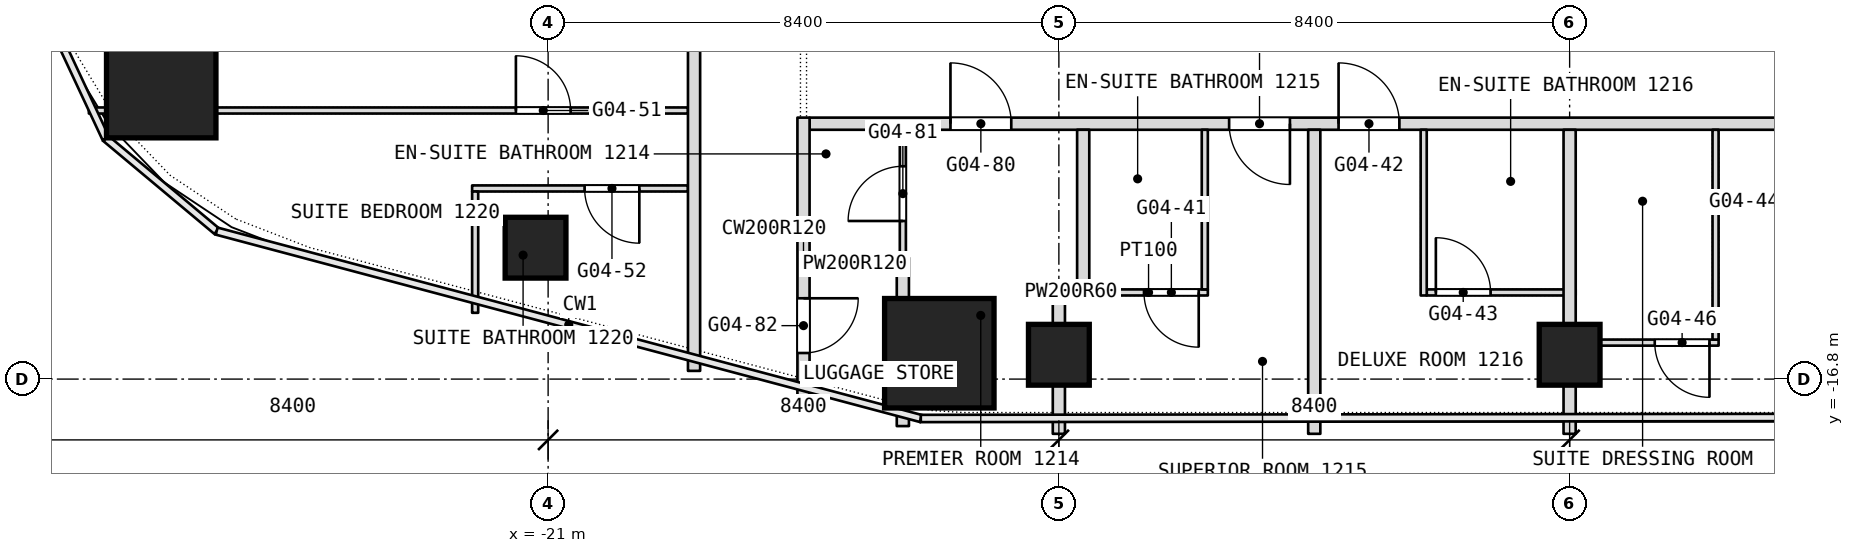
"""IFC4 building model, lengths in metres.
Left out: names, types, materials, properties, quantities, classifications, styles, units other than length and angle.
Written with IfcOpenShell. Run it as: python <this file> out.ifc"""

import sys

from ifc_helpers import new_model, si_unit, direction, frame, frame_2d, origin, origin_2d, place, context, subcontext, project, spatial, rectangle, extrude, element, fill, save


model = new_model("IFC4")
c1 = context("Model", 3, precision=1e-05, world=origin(), true_north=direction((0.0, 1.0)))
c2 = subcontext(c1, "Body", "Model", "MODEL_VIEW")
j1 = project(units=[si_unit("LENGTHUNIT", "METRE"), si_unit("PLANEANGLEUNIT", "RADIAN")], contexts=[c1])
p1 = place(None, origin())
s1 = spatial("IfcSite", under=j1, at=p1, CompositionType="ELEMENT")
p2 = place(p1, origin())
s2 = spatial("IfcBuilding", under=s1, at=p2, CompositionType="ELEMENT")
p3 = place(p2, frame((0.0, 0.0, 58.1)))
s3 = spatial("IfcBuildingStorey", under=s2, at=p3, CompositionType="ELEMENT", Elevation=58.1)
for number, where, z_axis, x_axis in (
    (1, (-27.363, -11.933, 0.0), (0.0, 0.0, 1.0), (1.0, 0.0, 0.0)),
    (2, (-14.566, -16.375, 0.0), (0.0, 0.0, 1.0), (1.0, 0.0, 0.0)),
):
    element("IfcColumn", number, at=place(p3, frame(where, z_axis=z_axis, x_axis=x_axis)), inside=s3, PredefinedType="COLUMN", context=c2, shape_type="SweptSolid", body=[
        extrude(rectangle(XDim=1.8, YDim=1.8, at=origin_2d()), origin(), (0.0, 0.0, 1.0), 3.6),
    ])
for number, where, z_axis, x_axis in (
    (3, (-4.2, -16.4, 0.0), (0.0, 0.0, 1.0), (1.0, 0.0, 0.0)),
    (4, (-12.6, -16.4, 0.0), (0.0, 0.0, 1.0), (1.0, 0.0, 0.0)),
    (5, (-21.207, -14.639, 0.0), (0.0, 0.0, 1.0), (1.0, 0.0, 0.0)),
):
    element("IfcColumn", number, at=place(p3, frame(where, z_axis=z_axis, x_axis=x_axis)), inside=s3, PredefinedType="COLUMN", context=c2, shape_type="SweptSolid", body=[
        extrude(rectangle(XDim=1.0, YDim=1.0, at=origin_2d()), origin(), (0.0, 0.0, 1.0), 3.6),
    ])
p4 = place(p3, frame((-4.1, -16.2, 0.0), z_axis=(0.0, 0.0, 1.0), x_axis=(1.0, 0.0, 0.0)))
e6 = element("IfcWall", 6, at=p4, inside=s3, PredefinedType="PARTITIONING", context=c2, shape_type="SweptSolid", body=[
    extrude(rectangle(XDim=2.35, YDim=0.1, at=frame_2d((1.175, 0.0))), origin(), (0.0, 0.0, 1.0), 2.94),
])
p5 = place(p4, frame((1.3, 0.0, 0.0)))
e7 = element("IfcOpeningElement", 7, at=p5, cuts=e6, PredefinedType="OPENING", context=c2, shape_type="SweptSolid", body=[
    extrude(rectangle(XDim=0.9, YDim=2.1, at=frame_2d((0.45, 1.05))), frame((0.0, 0.05, 0.0), z_axis=(0.0, -1.0, 0.0), x_axis=(1.0, 0.0, 0.0)), (0.0, 0.0, 1.0), 0.1),
])
p6 = place(p3, frame((-12.7, -15.375, 0.0), z_axis=(0.0, 0.0, 1.0), x_axis=(1.0, 0.0, 0.0)))
e8 = element("IfcWall", 8, at=p6, inside=s3, PredefinedType="PARTITIONING", context=c2, shape_type="SweptSolid", body=[
    extrude(rectangle(XDim=0.6, YDim=0.2, at=frame_2d((0.3, 0.0))), origin(), (0.0, 0.0, 1.0), 3.34),
])
p7 = place(p3, frame((-12.1, -15.375, 0.0), z_axis=(0.0, 0.0, 1.0), x_axis=(1.0, 0.0, 0.0)))
e9 = element("IfcWall", 9, at=p7, inside=s3, PredefinedType="PARTITIONING", context=c2, shape_type="SweptSolid", body=[
    extrude(rectangle(XDim=1.95, YDim=0.1, at=frame_2d((0.975, 0.0))), origin(), (0.0, 0.0, 1.0), 3.34),
])
p8 = place(p7, frame((0.9, 0.0, 0.0)))
e10 = element("IfcOpeningElement", 10, at=p8, cuts=e9, PredefinedType="OPENING", context=c2, shape_type="SweptSolid", body=[
    extrude(rectangle(XDim=0.9, YDim=2.1, at=frame_2d((0.45, 1.05))), frame((0.0, 0.05, 0.0), z_axis=(0.0, -1.0, 0.0), x_axis=(1.0, 0.0, 0.0)), (0.0, 0.0, 1.0), 0.1),
])
p9 = place(p3, frame((-6.55, -15.375, 0.0), z_axis=(0.0, 0.0, 1.0), x_axis=(1.0, 0.0, 0.0)))
e11 = element("IfcWall", 11, at=p9, inside=s3, PredefinedType="PARTITIONING", context=c2, shape_type="SweptSolid", body=[
    extrude(rectangle(XDim=2.45, YDim=0.1, at=frame_2d((1.225, 0.0))), origin(), (0.0, 0.0, 1.0), 3.34),
])
p10 = place(p9, frame((0.15, 0.0, 0.0)))
e12 = element("IfcOpeningElement", 12, at=p10, cuts=e11, PredefinedType="OPENING", context=c2, shape_type="SweptSolid", body=[
    extrude(rectangle(XDim=0.9, YDim=2.1, at=frame_2d((0.45, 1.05))), frame((0.0, 0.05, 0.0), z_axis=(0.0, -1.0, 0.0), x_axis=(1.0, 0.0, 0.0)), (0.0, 0.0, 1.0), 0.1),
])
p11 = place(p3, frame((-16.7, -14.9, 0.0), z_axis=(0.0, 0.0, 1.0), x_axis=(1.0, 0.0, 0.0)))
e13 = element("IfcWall", 13, at=p11, inside=s3, PredefinedType="PARTITIONING", context=c2, shape_type="SweptSolid", body=[
    extrude(rectangle(XDim=1.484, YDim=0.2, at=frame_2d((0.742, 0.0))), origin(), (0.0, 0.0, 1.0), 3.34),
])
p12 = place(p3, frame((-22.25, -13.665, 0.0), z_axis=(0.0, 0.0, 1.0), x_axis=(1.0, 0.0, 0.0)))
e14 = element("IfcWall", 14, at=p12, inside=s3, PredefinedType="PARTITIONING", context=c2, shape_type="SweptSolid", body=[
    extrude(rectangle(XDim=3.55, YDim=0.1, at=frame_2d((1.775, 0.0))), origin(), (0.0, 0.0, 1.0), 3.34),
])
p13 = place(p12, frame((1.85, 0.0, 0.0)))
e15 = element("IfcOpeningElement", 15, at=p13, cuts=e14, PredefinedType="OPENING", context=c2, shape_type="SweptSolid", body=[
    extrude(rectangle(XDim=0.9, YDim=2.1, at=frame_2d((0.45, 1.05))), frame((0.0, 0.05, 0.0), z_axis=(0.0, -1.0, 0.0), x_axis=(1.0, 0.0, 0.0)), (0.0, 0.0, 1.0), 0.1),
])
p14 = place(p3, frame((-16.7, -12.6, 0.0), z_axis=(0.0, 0.0, 1.0), x_axis=(1.0, 0.0, 0.0)))
e16 = element("IfcWall", 16, at=p14, inside=s3, PredefinedType="PARTITIONING", context=c2, shape_type="SweptSolid", body=[
    extrude(rectangle(XDim=33.4, YDim=0.2, at=frame_2d((16.7, 0.0))), origin(), (0.0, 0.0, 1.0), 3.34),
])
p15 = place(p14, frame((6.9, 0.0, 0.0)))
e17 = element("IfcOpeningElement", 17, at=p15, cuts=e16, PredefinedType="OPENING", context=c2, shape_type="SweptSolid", body=[
    extrude(rectangle(XDim=1.0, YDim=2.1, at=frame_2d((0.5, 1.05))), frame((0.0, 0.1, 0.0), z_axis=(0.0, -1.0, 0.0), x_axis=(1.0, 0.0, 0.0)), (0.0, 0.0, 1.0), 0.2),
])
p16 = place(p14, frame((8.7, 0.0, 0.0)))
e18 = element("IfcOpeningElement", 18, at=p16, cuts=e16, PredefinedType="OPENING", context=c2, shape_type="SweptSolid", body=[
    extrude(rectangle(XDim=1.0, YDim=2.1, at=frame_2d((0.5, 1.05))), frame((0.0, 0.1, 0.0), z_axis=(0.0, -1.0, 0.0), x_axis=(1.0, 0.0, 0.0)), (0.0, 0.0, 1.0), 0.2),
])
p17 = place(p14, frame((16.1, 0.0, 0.0)))
e19 = element("IfcOpeningElement", 19, at=p17, cuts=e16, PredefinedType="OPENING", context=c2, shape_type="SweptSolid", body=[
    extrude(rectangle(XDim=1.1, YDim=2.1, at=frame_2d((0.55, 1.05))), frame((0.0, 0.1, 0.0), z_axis=(0.0, -1.0, 0.0), x_axis=(1.0, 0.0, 0.0)), (0.0, 0.0, 1.0), 0.2),
])
p18 = place(p14, frame((24.6, 0.0, 0.0)))
e20 = element("IfcOpeningElement", 20, at=p18, cuts=e16, PredefinedType="OPENING", context=c2, shape_type="SweptSolid", body=[
    extrude(rectangle(XDim=1.1, YDim=2.1, at=frame_2d((0.55, 1.05))), frame((0.0, 0.1, 0.0), z_axis=(0.0, -1.0, 0.0), x_axis=(1.0, 0.0, 0.0)), (0.0, 0.0, 1.0), 0.2),
])
p19 = place(p14, frame((2.317, 0.0, 0.0)))
e21 = element("IfcOpeningElement", 21, at=p19, cuts=e16, PredefinedType="OPENING", context=c2, shape_type="SweptSolid", body=[
    extrude(rectangle(XDim=1.0, YDim=2.1, at=frame_2d((0.5, 1.05))), frame((0.0, 0.1, 0.0), z_axis=(0.0, -1.0, 0.0), x_axis=(1.0, 0.0, 0.0)), (0.0, 0.0, 1.0), 0.2),
])
p20 = place(p14, frame((30.033, 0.0, 0.0)))
e22 = element("IfcOpeningElement", 22, at=p20, cuts=e16, PredefinedType="OPENING", context=c2, shape_type="SweptSolid", body=[
    extrude(rectangle(XDim=1.0, YDim=2.1, at=frame_2d((0.5, 1.05))), frame((0.0, 0.1, 0.0), z_axis=(0.0, -1.0, 0.0), x_axis=(1.0, 0.0, 0.0)), (0.0, 0.0, 1.0), 0.2),
])
p21 = place(p3, frame((-28.553, -12.383, 0.0), z_axis=(0.0, 0.0, 1.0), x_axis=(1.0, 0.0, 0.0)))
e23 = element("IfcWall", 23, at=p21, inside=s3, PredefinedType="PARTITIONING", context=c2, shape_type="SweptSolid", body=[
    extrude(rectangle(XDim=0.29, YDim=0.1, at=frame_2d((0.145, 0.0))), origin(), (0.0, 0.0, 1.0), 3.34),
])
p22 = place(p3, frame((-26.463, -12.383, 0.0), z_axis=(0.0, 0.0, 1.0), x_axis=(1.0, 0.0, 0.0)))
e24 = element("IfcWall", 24, at=p22, inside=s3, PredefinedType="PARTITIONING", context=c2, shape_type="SweptSolid", body=[
    extrude(rectangle(XDim=7.763, YDim=0.1, at=frame_2d((3.881, 0.0))), origin(), (0.0, 0.0, 1.0), 3.34),
])
p23 = place(p22, frame((4.933, 0.0, 0.0)))
e25 = element("IfcOpeningElement", 25, at=p23, cuts=e24, PredefinedType="OPENING", context=c2, shape_type="SweptSolid", body=[
    extrude(rectangle(XDim=0.9, YDim=2.1, at=frame_2d((0.45, 1.05))), frame((0.0, 0.05, 0.0), z_axis=(0.0, -1.0, 0.0), x_axis=(1.0, 0.0, 0.0)), (0.0, 0.0, 1.0), 0.1),
])
p24 = place(p3, frame((-1.8, -16.15, 0.0), z_axis=(0.0, 0.0, 1.0), x_axis=(0.0, 1.0, 0.0)))
e26 = element("IfcWall", 26, at=p24, inside=s3, PredefinedType="PARTITIONING", context=c2, shape_type="SweptSolid", body=[
    extrude(rectangle(XDim=3.45, YDim=0.1, at=frame_2d((1.725, 0.0))), origin(), (0.0, 0.0, 1.0), 3.34),
])
p25 = place(p3, frame((-4.2, -17.7, 0.0), z_axis=(0.0, 0.0, 1.0), x_axis=(0.0, 1.0, 0.0)))
e27 = element("IfcWall", 27, at=p25, inside=s3, PredefinedType="PARTITIONING", context=c2, shape_type="SweptSolid", body=[
    extrude(rectangle(XDim=5.0, YDim=0.2, at=frame_2d((2.5, 0.0))), origin(), (0.0, 0.0, 1.0), 3.34),
])
p26 = place(p3, frame((-6.6, -15.425, 0.0), z_axis=(0.0, 0.0, 1.0), x_axis=(0.0, 1.0, 0.0)))
e28 = element("IfcWall", 28, at=p26, inside=s3, PredefinedType="PARTITIONING", context=c2, shape_type="SweptSolid", body=[
    extrude(rectangle(XDim=2.725, YDim=0.1, at=frame_2d((1.363, 0.0))), origin(), (0.0, 0.0, 1.0), 3.34),
])
p27 = place(p3, frame((-8.4, -17.7, 0.0), z_axis=(0.0, 0.0, 1.0), x_axis=(0.0, 1.0, 0.0)))
e29 = element("IfcWall", 29, at=p27, inside=s3, PredefinedType="PARTITIONING", context=c2, shape_type="SweptSolid", body=[
    extrude(rectangle(XDim=5.0, YDim=0.2, at=frame_2d((2.5, 0.0))), origin(), (0.0, 0.0, 1.0), 3.34),
])
p28 = place(p3, frame((-10.2, -15.325, 0.0), z_axis=(0.0, 0.0, 1.0), x_axis=(0.0, 1.0, 0.0)))
e30 = element("IfcWall", 30, at=p28, inside=s3, PredefinedType="PARTITIONING", context=c2, shape_type="SweptSolid", body=[
    extrude(rectangle(XDim=2.625, YDim=0.1, at=frame_2d((1.312, 0.0))), origin(), (0.0, 0.0, 1.0), 3.34),
])
p29 = place(p3, frame((-12.2, -15.275, 0.0), z_axis=(0.0, 0.0, 1.0), x_axis=(0.0, 1.0, 0.0)))
e31 = element("IfcWall", 31, at=p29, inside=s3, PredefinedType="PARTITIONING", context=c2, shape_type="SweptSolid", body=[
    extrude(rectangle(XDim=2.575, YDim=0.2, at=frame_2d((1.288, 0.0))), origin(), (0.0, 0.0, 1.0), 3.34),
])
p30 = place(p3, frame((-12.6, -17.7, 0.0), z_axis=(0.0, 0.0, 1.0), x_axis=(0.0, 1.0, 0.0)))
e32 = element("IfcWall", 32, at=p30, inside=s3, PredefinedType="PARTITIONING", context=c2, shape_type="SweptSolid", body=[
    extrude(rectangle(XDim=2.225, YDim=0.2, at=frame_2d((1.112, 0.0))), origin(), (0.0, 0.0, 1.0), 3.34),
])
p31 = place(p3, frame((-15.166, -17.573, 0.0), z_axis=(0.0, 0.0, 1.0), x_axis=(0.0, 1.0, 0.0)))
e33 = element("IfcWall", 33, at=p31, inside=s3, PredefinedType="PARTITIONING", context=c2, shape_type="SweptSolid", body=[
    extrude(rectangle(XDim=0.298, YDim=0.2, at=frame_2d((0.149, 0.0))), origin(), (0.0, 0.0, 1.0), 3.34),
])
p32 = place(p3, frame((-15.166, -15.475, 0.0), z_axis=(0.0, 0.0, 1.0), x_axis=(0.0, 1.0, 0.0)))
e34 = element("IfcWall", 34, at=p32, inside=s3, PredefinedType="PARTITIONING", context=c2, shape_type="SweptSolid", body=[
    extrude(rectangle(XDim=0.675, YDim=0.2, at=frame_2d((0.337, 0.0))), origin(), (0.0, 0.0, 1.0), 3.34),
])
p33 = place(p3, frame((-15.166, -15.0, 0.0), z_axis=(0.0, 0.0, 1.0), x_axis=(0.0, 1.0, 0.0)))
e35 = element("IfcWall", 35, at=p33, inside=s3, PredefinedType="PARTITIONING", context=c2, shape_type="SweptSolid", body=[
    extrude(rectangle(XDim=2.3, YDim=0.1, at=frame_2d((1.15, 0.0))), origin(), (0.0, 0.0, 1.0), 3.34),
])
p34 = place(p33, frame((0.8, 0.0, 0.0)))
e36 = element("IfcOpeningElement", 36, at=p34, cuts=e35, PredefinedType="OPENING", context=c2, shape_type="SweptSolid", body=[
    extrude(rectangle(XDim=0.9, YDim=2.1, at=frame_2d((0.45, 1.05))), frame((0.0, 0.05, 0.0), z_axis=(0.0, -1.0, 0.0), x_axis=(1.0, 0.0, 0.0)), (0.0, 0.0, 1.0), 0.1),
])
p35 = place(p3, frame((-16.8, -17.143, 0.0), z_axis=(0.0, 0.0, 1.0), x_axis=(0.0, 1.0, 0.0)))
e37 = element("IfcWall", 37, at=p35, inside=s3, PredefinedType="PARTITIONING", context=c2, shape_type="SweptSolid", body=[
    extrude(rectangle(XDim=4.643, YDim=0.2, at=frame_2d((2.322, 0.0))), origin(), (0.0, 0.0, 1.0), 3.34),
])
p36 = place(p35, frame((0.772, 0.0, 0.0)))
e38 = element("IfcOpeningElement", 38, at=p36, cuts=e37, PredefinedType="OPENING", context=c2, shape_type="SweptSolid", body=[
    extrude(rectangle(XDim=0.9, YDim=2.1, at=frame_2d((0.45, 1.05))), frame((0.0, 0.1, 0.0), z_axis=(0.0, -1.0, 0.0), x_axis=(1.0, 0.0, 0.0)), (0.0, 0.0, 1.0), 0.2),
])
p37 = place(p3, frame((-18.6, -16.665, 0.0), z_axis=(0.0, 0.0, 1.0), x_axis=(0.0, 1.0, 0.0)))
e39 = element("IfcWall", 39, at=p37, inside=s3, PredefinedType="PARTITIONING", context=c2, shape_type="SweptSolid", body=[
    extrude(rectangle(XDim=23.565, YDim=0.2, at=frame_2d((11.782, 0.0))), origin(), (0.0, 0.0, 1.0), 3.34),
])
p38 = place(p37, frame((5.724, 0.0, 0.0)))
e40 = element("IfcOpeningElement", 40, at=p38, cuts=e39, PredefinedType="OPENING", context=c2, shape_type="SweptSolid", body=[
    extrude(rectangle(XDim=1.1, YDim=2.1, at=frame_2d((0.55, 1.05))), frame((0.0, 0.1, 0.0), z_axis=(0.0, -1.0, 0.0), x_axis=(1.0, 0.0, 0.0)), (0.0, 0.0, 1.0), 0.2),
])
p39 = place(p37, frame((8.665, 0.0, 0.0)))
e41 = element("IfcOpeningElement", 41, at=p39, cuts=e39, PredefinedType="OPENING", context=c2, shape_type="SweptSolid", body=[
    extrude(rectangle(XDim=1.0, YDim=2.1, at=frame_2d((0.5, 1.05))), frame((0.0, 0.1, 0.0), z_axis=(0.0, -1.0, 0.0), x_axis=(1.0, 0.0, 0.0)), (0.0, 0.0, 1.0), 0.2),
])
p40 = place(p37, frame((15.265, 0.0, 0.0)))
e42 = element("IfcOpeningElement", 42, at=p40, cuts=e39, PredefinedType="OPENING", context=c2, shape_type="SweptSolid", body=[
    extrude(rectangle(XDim=1.0, YDim=2.1, at=frame_2d((0.5, 1.05))), frame((0.0, 0.1, 0.0), z_axis=(0.0, -1.0, 0.0), x_axis=(1.0, 0.0, 0.0)), (0.0, 0.0, 1.0), 0.2),
])
p41 = place(p37, frame((19.465, 0.0, 0.0)))
e43 = element("IfcOpeningElement", 43, at=p41, cuts=e39, PredefinedType="OPENING", context=c2, shape_type="SweptSolid", body=[
    extrude(rectangle(XDim=1.0, YDim=2.1, at=frame_2d((0.5, 1.05))), frame((0.0, 0.1, 0.0), z_axis=(0.0, -1.0, 0.0), x_axis=(1.0, 0.0, 0.0)), (0.0, 0.0, 1.0), 0.2),
])
p42 = place(p3, frame((-22.2, -15.71, 0.0), z_axis=(0.0, 0.0, 1.0), x_axis=(0.0, 1.0, 0.0)))
e44 = element("IfcWall", 44, at=p42, inside=s3, PredefinedType="PARTITIONING", context=c2, shape_type="SweptSolid", body=[
    extrude(rectangle(XDim=1.995, YDim=0.1, at=frame_2d((0.998, 0.0))), origin(), (0.0, 0.0, 1.0), 3.34),
])
p43 = place(p5, origin())
e45 = element("IfcDoor", 45, at=p43, inside=s3, OperationType="SINGLE_SWING_RIGHT", PredefinedType="DOOR", context=c2, shape_type="SweptSolid", body=[
    extrude(rectangle(XDim=0.9, YDim=2.1, at=frame_2d((0.45, 1.05))), frame((0.0, 0.025, 0.0), z_axis=(0.0, -1.0, 0.0), x_axis=(1.0, 0.0, 0.0)), (0.0, 0.0, 1.0), 0.05),
])
fill(e7, e45)
p44 = place(p8, origin())
e46 = element("IfcDoor", 46, at=p44, inside=s3, OperationType="SINGLE_SWING_RIGHT", PredefinedType="DOOR", context=c2, shape_type="SweptSolid", body=[
    extrude(rectangle(XDim=0.9, YDim=2.1, at=frame_2d((0.45, 1.05))), frame((0.0, 0.025, 0.0), z_axis=(0.0, -1.0, 0.0), x_axis=(1.0, 0.0, 0.0)), (0.0, 0.0, 1.0), 0.05),
])
fill(e10, e46)
p45 = place(p10, origin())
e47 = element("IfcDoor", 47, at=p45, inside=s3, OperationType="SINGLE_SWING_LEFT", PredefinedType="DOOR", context=c2, shape_type="SweptSolid", body=[
    extrude(rectangle(XDim=0.9, YDim=2.1, at=frame_2d((0.45, 1.05))), frame((0.0, 0.025, 0.0), z_axis=(0.0, -1.0, 0.0), x_axis=(1.0, 0.0, 0.0)), (0.0, 0.0, 1.0), 0.05),
])
fill(e12, e47)
p46 = place(p13, origin())
e48 = element("IfcDoor", 48, at=p46, inside=s3, OperationType="SINGLE_SWING_RIGHT", PredefinedType="DOOR", context=c2, shape_type="SweptSolid", body=[
    extrude(rectangle(XDim=0.9, YDim=2.1, at=frame_2d((0.45, 1.05))), frame((0.0, 0.025, 0.0), z_axis=(0.0, -1.0, 0.0), x_axis=(1.0, 0.0, 0.0)), (0.0, 0.0, 1.0), 0.05),
])
fill(e15, e48)
p47 = place(p15, origin())
e49 = element("IfcDoor", 49, at=p47, inside=s3, OperationType="SINGLE_SWING_RIGHT", PredefinedType="DOOR", context=c2, shape_type="SweptSolid", body=[
    extrude(rectangle(XDim=1.0, YDim=2.1, at=frame_2d((0.5, 1.05))), frame((0.0, 0.025, 0.0), z_axis=(0.0, -1.0, 0.0), x_axis=(1.0, 0.0, 0.0)), (0.0, 0.0, 1.0), 0.05),
])
fill(e17, e49)
p48 = place(p16, origin())
e50 = element("IfcDoor", 50, at=p48, inside=s3, OperationType="SINGLE_SWING_RIGHT", PredefinedType="DOOR", context=c2, shape_type="SweptSolid", body=[
    extrude(rectangle(XDim=1.0, YDim=2.1, at=frame_2d((0.5, 1.05))), frame((0.0, 0.025, 0.0), z_axis=(0.0, -1.0, 0.0), x_axis=(1.0, 0.0, 0.0)), (0.0, 0.0, 1.0), 0.05),
])
fill(e18, e50)
p49 = place(p19, origin())
e51 = element("IfcDoor", 51, at=p49, inside=s3, OperationType="SINGLE_SWING_RIGHT", PredefinedType="DOOR", context=c2, shape_type="SweptSolid", body=[
    extrude(rectangle(XDim=1.0, YDim=2.1, at=frame_2d((0.5, 1.05))), frame((0.0, 0.025, 0.0), z_axis=(0.0, -1.0, 0.0), x_axis=(1.0, 0.0, 0.0)), (0.0, 0.0, 1.0), 0.05),
])
fill(e21, e51)
p50 = place(p23, origin())
e52 = element("IfcDoor", 52, at=p50, inside=s3, OperationType="SINGLE_SWING_LEFT", PredefinedType="DOOR", context=c2, shape_type="SweptSolid", body=[
    extrude(rectangle(XDim=0.9, YDim=2.1, at=frame_2d((0.45, 1.05))), frame((0.0, 0.025, 0.0), z_axis=(0.0, -1.0, 0.0), x_axis=(1.0, 0.0, 0.0)), (0.0, 0.0, 1.0), 0.05),
])
fill(e25, e52)
p51 = place(p34, origin())
e53 = element("IfcDoor", 53, at=p51, inside=s3, OperationType="SINGLE_SWING_RIGHT", PredefinedType="DOOR", context=c2, shape_type="SweptSolid", body=[
    extrude(rectangle(XDim=0.9, YDim=2.1, at=frame_2d((0.45, 1.05))), frame((0.0, 0.025, 0.0), z_axis=(0.0, -1.0, 0.0), x_axis=(1.0, 0.0, 0.0)), (0.0, 0.0, 1.0), 0.05),
])
fill(e36, e53)
p52 = place(p36, origin())
e54 = element("IfcDoor", 54, at=p52, inside=s3, OperationType="SINGLE_SWING_LEFT", PredefinedType="DOOR", context=c2, shape_type="SweptSolid", body=[
    extrude(rectangle(XDim=0.9, YDim=2.1, at=frame_2d((0.45, 1.05))), frame((0.0, 0.025, 0.0), z_axis=(0.0, -1.0, 0.0), x_axis=(1.0, 0.0, 0.0)), (0.0, 0.0, 1.0), 0.05),
])
fill(e38, e54)
save(model, sys.argv[1])
